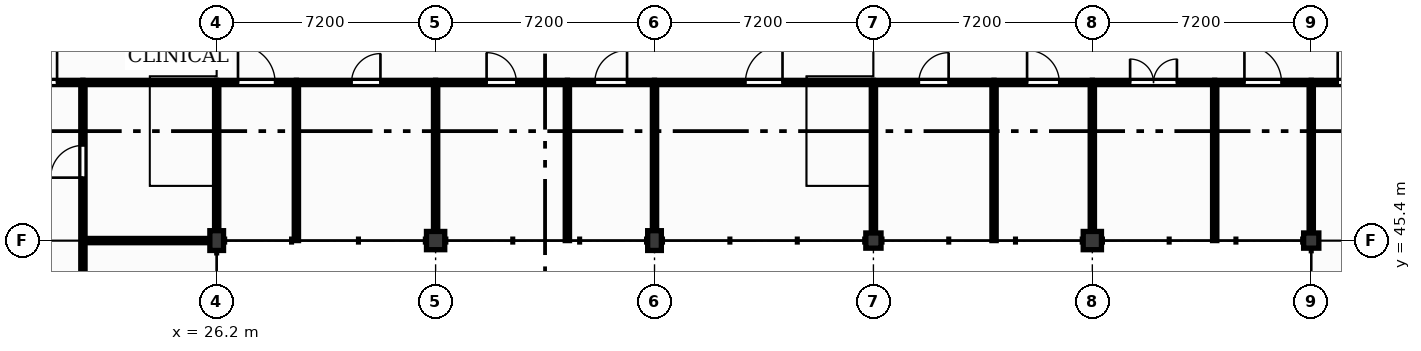
"""IFC4 building model, lengths in metres.
Left out: names, types, materials, properties, quantities, classifications, styles, units other than length and angle.
Written with IfcOpenShell. Run it as: python <this file> out.ifc"""

import sys

from ifc_helpers import new_model, si_unit, direction, frame, frame_2d, origin, origin_2d, place, context, subcontext, project, spatial, rectangle, extrude, element, fill, save


model = new_model("IFC4")
c1 = context("Model", 3, precision=1e-05, world=origin(), true_north=direction((0.0, 1.0)))
c2 = subcontext(c1, "Body", "Model", "MODEL_VIEW")
j1 = project(units=[si_unit("LENGTHUNIT", "METRE"), si_unit("PLANEANGLEUNIT", "RADIAN")], contexts=[c1])
p1 = place(None, origin())
s1 = spatial("IfcSite", under=j1, at=p1, CompositionType="ELEMENT")
p2 = place(p1, origin())
s2 = spatial("IfcBuilding", under=s1, at=p2, CompositionType="ELEMENT")
p3 = place(p2, origin())
s3 = spatial("IfcBuildingStorey", under=s2, at=p3, CompositionType="ELEMENT", Elevation=0.0)
p4 = place(p3, frame((26.2, 45.4, 0.0), z_axis=(0.0, 0.0, 1.0), x_axis=(1.0, 0.0, 0.0)))
e1 = element("IfcColumn", 1, at=p4, inside=s3, PredefinedType="COLUMN", context=c2, shape_type="SweptSolid", body=[
    extrude(rectangle(XDim=0.45, YDim=0.65, at=origin_2d()), origin(), (0.0, 0.0, 1.0), 4.2),
])
p5 = place(p3, frame((33.4, 45.4, 0.0), z_axis=(0.0, 0.0, 1.0), x_axis=(1.0, 0.0, 0.0)))
e2 = element("IfcColumn", 2, at=p5, inside=s3, PredefinedType="COLUMN", context=c2, shape_type="SweptSolid", body=[
    extrude(rectangle(XDim=0.6, YDim=0.6, at=origin_2d()), origin(), (0.0, 0.0, 1.0), 4.2),
])
p6 = place(p3, frame((40.6, 45.4, 0.0), z_axis=(0.0, 0.0, 1.0), x_axis=(1.0, 0.0, 0.0)))
e3 = element("IfcColumn", 3, at=p6, inside=s3, PredefinedType="COLUMN", context=c2, shape_type="SweptSolid", body=[
    extrude(rectangle(XDim=0.45, YDim=0.65, at=origin_2d()), origin(), (0.0, 0.0, 1.0), 4.2),
])
p7 = place(p3, frame((47.8, 45.4, 0.0), z_axis=(0.0, 0.0, 1.0), x_axis=(1.0, 0.0, 0.0)))
e4 = element("IfcColumn", 4, at=p7, inside=s3, PredefinedType="COLUMN", context=c2, shape_type="SweptSolid", body=[
    extrude(rectangle(XDim=0.5, YDim=0.5, at=origin_2d()), origin(), (0.0, 0.0, 1.0), 4.2),
])
p8 = place(p3, frame((55.0, 45.4, 0.0), z_axis=(0.0, 0.0, 1.0), x_axis=(1.0, 0.0, 0.0)))
e5 = element("IfcColumn", 5, at=p8, inside=s3, PredefinedType="COLUMN", context=c2, shape_type="SweptSolid", body=[
    extrude(rectangle(XDim=0.6, YDim=0.6, at=origin_2d()), origin(), (0.0, 0.0, 1.0), 4.2),
])
p9 = place(p3, frame((62.2, 45.4, 0.0), z_axis=(0.0, 0.0, 1.0), x_axis=(1.0, 0.0, 0.0)))
e6 = element("IfcColumn", 6, at=p9, inside=s3, PredefinedType="COLUMN", context=c2, shape_type="SweptSolid", body=[
    extrude(rectangle(XDim=0.5, YDim=0.5, at=origin_2d()), origin(), (0.0, 0.0, 1.0), 4.2),
])
p10 = place(p3, frame((19.0, 50.6, 0.0), z_axis=(0.0, 0.0, 1.0), x_axis=(1.0, 0.0, 0.0)))
e7 = element("IfcWall", 7, at=p10, inside=s3, PredefinedType="PARTITIONING", context=c2, shape_type="SweptSolid", body=[
    extrude(rectangle(XDim=2.8, YDim=0.14, at=frame_2d((1.4, 0.0))), origin(), (0.0, 0.0, 1.0), 4.18),
])
p11 = place(p10, frame((0.85, 0.0, 0.0)))
e8 = element("IfcOpeningElement", 8, at=p11, cuts=e7, PredefinedType="OPENING", context=c2, shape_type="SweptSolid", body=[
    extrude(rectangle(XDim=1.1, YDim=2.1, at=frame_2d((0.55, 1.05))), frame((0.0, 0.08, 0.0), z_axis=(0.0, -1.0, 0.0), x_axis=(1.0, 0.0, 0.0)), (0.0, 0.0, 1.0), 0.16),
])
p12 = place(p3, frame((21.8, 36.87, 0.0), z_axis=(0.0, 0.0, 1.0), x_axis=(0.0, 1.0, 0.0)))
e9 = element("IfcWall", 9, at=p12, inside=s3, PredefinedType="PARTITIONING", context=c2, shape_type="SweptSolid", body=[
    extrude(rectangle(XDim=8.46, YDim=0.14, at=frame_2d((4.23, 0.0))), origin(), (0.0, 0.0, 1.0), 4.18),
])
p13 = place(p12, frame((3.65, 0.0, 0.0)))
e10 = element("IfcOpeningElement", 10, at=p13, cuts=e9, PredefinedType="OPENING", context=c2, shape_type="SweptSolid", body=[
    extrude(rectangle(XDim=1.16, YDim=2.1, at=frame_2d((0.58, 1.05))), frame((0.0, 0.08, 0.0), z_axis=(0.0, -1.0, 0.0), x_axis=(1.0, 0.0, 0.0)), (0.0, 0.0, 1.0), 0.16),
])
p14 = place(p3, frame((21.8, 45.47, 0.0), z_axis=(0.0, 0.0, 1.0), x_axis=(0.0, 1.0, 0.0)))
e11 = element("IfcWall", 11, at=p14, inside=s3, PredefinedType="PARTITIONING", context=c2, shape_type="SweptSolid", body=[
    extrude(rectangle(XDim=5.06, YDim=0.14, at=frame_2d((2.53, 0.0))), origin(), (0.0, 0.0, 1.0), 4.18),
])
p15 = place(p14, frame((2.0, 0.0, 0.0)))
e12 = element("IfcOpeningElement", 12, at=p15, cuts=e11, PredefinedType="OPENING", context=c2, shape_type="SweptSolid", body=[
    extrude(rectangle(XDim=1.06, YDim=2.15, at=frame_2d((0.53, 1.075))), frame((0.0, 0.08, 0.0), z_axis=(0.0, -1.0, 0.0), x_axis=(1.0, 0.0, 0.0)), (0.0, 0.0, 1.0), 0.16),
])
p16 = place(p3, frame((21.8, 45.4, 0.0), z_axis=(0.0, 0.0, 1.0), x_axis=(1.0, 0.0, 0.0)))
e13 = element("IfcWall", 13, at=p16, inside=s3, PredefinedType="PARTITIONING", context=c2, shape_type="SweptSolid", body=[
    extrude(rectangle(XDim=4.175, YDim=0.14, at=frame_2d((2.087, 0.0))), origin(), (0.0, 0.0, 1.0), 3.25),
])
p17 = place(p3, frame((21.8, 50.6, 0.0), z_axis=(0.0, 0.0, 1.0), x_axis=(1.0, 0.0, 0.0)))
e14 = element("IfcWall", 14, at=p17, inside=s3, PredefinedType="PARTITIONING", context=c2, shape_type="SweptSolid", body=[
    extrude(rectangle(XDim=4.4, YDim=0.14, at=frame_2d((2.2, 0.0))), origin(), (0.0, 0.0, 1.0), 4.18),
])
p18 = place(p3, frame((26.2, 45.725, 0.0), z_axis=(0.0, 0.0, 1.0), x_axis=(0.0, 1.0, 0.0)))
e15 = element("IfcWall", 15, at=p18, inside=s3, PredefinedType="PARTITIONING", context=c2, shape_type="SweptSolid", body=[
    extrude(rectangle(XDim=4.805, YDim=0.14, at=frame_2d((2.402, 0.0))), origin(), (0.0, 0.0, 1.0), 3.5),
])
p19 = place(p3, frame((26.2, 50.6, 0.0), z_axis=(0.0, 0.0, 1.0), x_axis=(1.0, 0.0, 0.0)))
e16 = element("IfcWall", 16, at=p19, inside=s3, PredefinedType="PARTITIONING", context=c2, shape_type="SweptSolid", body=[
    extrude(rectangle(XDim=2.621, YDim=0.14, at=frame_2d((1.311, 0.0))), origin(), (0.0, 0.0, 1.0), 4.18),
])
p20 = place(p19, frame((0.7, 0.0, 0.0)))
e17 = element("IfcOpeningElement", 17, at=p20, cuts=e16, PredefinedType="OPENING", context=c2, shape_type="SweptSolid", body=[
    extrude(rectangle(XDim=1.22, YDim=2.1, at=frame_2d((0.61, 1.05))), frame((0.0, 0.08, 0.0), z_axis=(0.0, -1.0, 0.0), x_axis=(1.0, 0.0, 0.0)), (0.0, 0.0, 1.0), 0.16),
])
p21 = place(p3, frame((28.821, 45.4, 0.0), z_axis=(0.0, 0.0, 1.0), x_axis=(0.0, 1.0, 0.0)))
e18 = element("IfcWall", 18, at=p21, inside=s3, PredefinedType="PARTITIONING", context=c2, shape_type="SweptSolid", body=[
    extrude(rectangle(XDim=5.13, YDim=0.14, at=frame_2d((2.565, 0.0))), origin(), (0.0, 0.0, 1.0), 4.18),
])
p22 = place(p3, frame((28.821, 50.6, 0.0), z_axis=(0.0, 0.0, 1.0), x_axis=(1.0, 0.0, 0.0)))
e19 = element("IfcWall", 19, at=p22, inside=s3, PredefinedType="PARTITIONING", context=c2, shape_type="SweptSolid", body=[
    extrude(rectangle(XDim=4.579, YDim=0.14, at=frame_2d((2.29, 0.0))), origin(), (0.0, 0.0, 1.0), 4.18),
])
p23 = place(p22, frame((1.814, 0.0, 0.0)))
e20 = element("IfcOpeningElement", 20, at=p23, cuts=e19, PredefinedType="OPENING", context=c2, shape_type="SweptSolid", body=[
    extrude(rectangle(XDim=0.95, YDim=2.1, at=frame_2d((0.475, 1.05))), frame((0.0, 0.08, 0.0), z_axis=(0.0, -1.0, 0.0), x_axis=(1.0, 0.0, 0.0)), (0.0, 0.0, 1.0), 0.16),
])
p24 = place(p3, frame((33.4, 45.7, 0.0), z_axis=(0.0, 0.0, 1.0), x_axis=(0.0, 1.0, 0.0)))
e21 = element("IfcWall", 21, at=p24, inside=s3, PredefinedType="PARTITIONING", context=c2, shape_type="SweptSolid", body=[
    extrude(rectangle(XDim=4.83, YDim=0.14, at=frame_2d((2.415, 0.0))), origin(), (0.0, 0.0, 1.0), 3.5),
])
p25 = place(p3, frame((33.4, 50.6, 0.0), z_axis=(0.0, 0.0, 1.0), x_axis=(1.0, 0.0, 0.0)))
e22 = element("IfcWall", 22, at=p25, inside=s3, PredefinedType="PARTITIONING", context=c2, shape_type="SweptSolid", body=[
    extrude(rectangle(XDim=4.334, YDim=0.14, at=frame_2d((2.167, 0.0))), origin(), (0.0, 0.0, 1.0), 4.18),
])
p26 = place(p25, frame((1.677, 0.0, 0.0)))
e23 = element("IfcOpeningElement", 23, at=p26, cuts=e22, PredefinedType="OPENING", context=c2, shape_type="SweptSolid", body=[
    extrude(rectangle(XDim=0.98, YDim=2.15, at=frame_2d((0.49, 1.075))), frame((0.0, 0.08, 0.0), z_axis=(0.0, -1.0, 0.0), x_axis=(1.0, 0.0, 0.0)), (0.0, 0.0, 1.0), 0.16),
])
p27 = place(p3, frame((37.734, 45.4, 0.0), z_axis=(0.0, 0.0, 1.0), x_axis=(0.0, 1.0, 0.0)))
e24 = element("IfcWall", 24, at=p27, inside=s3, PredefinedType="PARTITIONING", context=c2, shape_type="SweptSolid", body=[
    extrude(rectangle(XDim=5.13, YDim=0.14, at=frame_2d((2.565, 0.0))), origin(), (0.0, 0.0, 1.0), 4.18),
])
p28 = place(p3, frame((37.734, 50.6, 0.0), z_axis=(0.0, 0.0, 1.0), x_axis=(1.0, 0.0, 0.0)))
e25 = element("IfcWall", 25, at=p28, inside=s3, PredefinedType="PARTITIONING", context=c2, shape_type="SweptSolid", body=[
    extrude(rectangle(XDim=2.866, YDim=0.14, at=frame_2d((1.433, 0.0))), origin(), (0.0, 0.0, 1.0), 4.18),
])
p29 = place(p28, frame((0.903, 0.0, 0.0)))
e26 = element("IfcOpeningElement", 26, at=p29, cuts=e25, PredefinedType="OPENING", context=c2, shape_type="SweptSolid", body=[
    extrude(rectangle(XDim=1.06, YDim=2.15, at=frame_2d((0.53, 1.075))), frame((0.0, 0.08, 0.0), z_axis=(0.0, -1.0, 0.0), x_axis=(1.0, 0.0, 0.0)), (0.0, 0.0, 1.0), 0.16),
])
p30 = place(p3, frame((40.6, 45.725, 0.0), z_axis=(0.0, 0.0, 1.0), x_axis=(0.0, 1.0, 0.0)))
e27 = element("IfcWall", 27, at=p30, inside=s3, PredefinedType="PARTITIONING", context=c2, shape_type="SweptSolid", body=[
    extrude(rectangle(XDim=4.805, YDim=0.14, at=frame_2d((2.402, 0.0))), origin(), (0.0, 0.0, 1.0), 3.5),
])
p31 = place(p3, frame((40.6, 50.6, 0.0), z_axis=(0.0, 0.0, 1.0), x_axis=(1.0, 0.0, 0.0)))
e28 = element("IfcWall", 28, at=p31, inside=s3, PredefinedType="PARTITIONING", context=c2, shape_type="SweptSolid", body=[
    extrude(rectangle(XDim=7.2, YDim=0.14, at=frame_2d((3.6, 0.0))), origin(), (0.0, 0.0, 1.0), 4.18),
])
p32 = place(p31, frame((2.99, 0.0, 0.0)))
e29 = element("IfcOpeningElement", 29, at=p32, cuts=e28, PredefinedType="OPENING", context=c2, shape_type="SweptSolid", body=[
    extrude(rectangle(XDim=1.22, YDim=2.1, at=frame_2d((0.61, 1.05))), frame((0.0, 0.08, 0.0), z_axis=(0.0, -1.0, 0.0), x_axis=(1.0, 0.0, 0.0)), (0.0, 0.0, 1.0), 0.16),
])
p33 = place(p3, frame((47.8, 45.65, 0.0), z_axis=(0.0, 0.0, 1.0), x_axis=(0.0, 1.0, 0.0)))
e30 = element("IfcWall", 30, at=p33, inside=s3, PredefinedType="PARTITIONING", context=c2, shape_type="SweptSolid", body=[
    extrude(rectangle(XDim=4.88, YDim=0.14, at=frame_2d((2.44, 0.0))), origin(), (0.0, 0.0, 1.0), 3.5),
])
p34 = place(p3, frame((47.8, 50.6, 0.0), z_axis=(0.0, 0.0, 1.0), x_axis=(1.0, 0.0, 0.0)))
e31 = element("IfcWall", 31, at=p34, inside=s3, PredefinedType="PARTITIONING", context=c2, shape_type="SweptSolid", body=[
    extrude(rectangle(XDim=3.967, YDim=0.14, at=frame_2d((1.983, 0.0))), origin(), (0.0, 0.0, 1.0), 4.18),
])
p35 = place(p34, frame((1.493, 0.0, 0.0)))
e32 = element("IfcOpeningElement", 32, at=p35, cuts=e31, PredefinedType="OPENING", context=c2, shape_type="SweptSolid", body=[
    extrude(rectangle(XDim=0.98, YDim=2.15, at=frame_2d((0.49, 1.075))), frame((0.0, 0.08, 0.0), z_axis=(0.0, -1.0, 0.0), x_axis=(1.0, 0.0, 0.0)), (0.0, 0.0, 1.0), 0.16),
])
p36 = place(p3, frame((51.767, 45.4, 0.0), z_axis=(0.0, 0.0, 1.0), x_axis=(0.0, 1.0, 0.0)))
e33 = element("IfcWall", 33, at=p36, inside=s3, PredefinedType="PARTITIONING", context=c2, shape_type="SweptSolid", body=[
    extrude(rectangle(XDim=5.13, YDim=0.14, at=frame_2d((2.565, 0.0))), origin(), (0.0, 0.0, 1.0), 4.18),
])
p37 = place(p3, frame((51.767, 50.6, 0.0), z_axis=(0.0, 0.0, 1.0), x_axis=(1.0, 0.0, 0.0)))
e34 = element("IfcWall", 34, at=p37, inside=s3, PredefinedType="PARTITIONING", context=c2, shape_type="SweptSolid", body=[
    extrude(rectangle(XDim=3.233, YDim=0.14, at=frame_2d((1.616, 0.0))), origin(), (0.0, 0.0, 1.0), 4.18),
])
p38 = place(p37, frame((1.086, 0.0, 0.0)))
e35 = element("IfcOpeningElement", 35, at=p38, cuts=e34, PredefinedType="OPENING", context=c2, shape_type="SweptSolid", body=[
    extrude(rectangle(XDim=1.06, YDim=2.15, at=frame_2d((0.53, 1.075))), frame((0.0, 0.08, 0.0), z_axis=(0.0, -1.0, 0.0), x_axis=(1.0, 0.0, 0.0)), (0.0, 0.0, 1.0), 0.16),
])
p39 = place(p3, frame((55.0, 45.7, 0.0), z_axis=(0.0, 0.0, 1.0), x_axis=(0.0, 1.0, 0.0)))
e36 = element("IfcWall", 36, at=p39, inside=s3, PredefinedType="PARTITIONING", context=c2, shape_type="SweptSolid", body=[
    extrude(rectangle(XDim=4.83, YDim=0.14, at=frame_2d((2.415, 0.0))), origin(), (0.0, 0.0, 1.0), 3.5),
])
p40 = place(p3, frame((55.0, 50.6, 0.0), z_axis=(0.0, 0.0, 1.0), x_axis=(1.0, 0.0, 0.0)))
e37 = element("IfcWall", 37, at=p40, inside=s3, PredefinedType="PARTITIONING", context=c2, shape_type="SweptSolid", body=[
    extrude(rectangle(XDim=4.025, YDim=0.14, at=frame_2d((2.012, 0.0))), origin(), (0.0, 0.0, 1.0), 4.18),
])
p41 = place(p40, frame((1.242, 0.0, 0.0)))
e38 = element("IfcOpeningElement", 38, at=p41, cuts=e37, PredefinedType="OPENING", context=c2, shape_type="SweptSolid", body=[
    extrude(rectangle(XDim=1.54, YDim=2.25, at=frame_2d((0.77, 1.125))), frame((0.0, 0.08, 0.0), z_axis=(0.0, -1.0, 0.0), x_axis=(1.0, 0.0, 0.0)), (0.0, 0.0, 1.0), 0.16),
])
p42 = place(p3, frame((59.025, 45.4, 0.0), z_axis=(0.0, 0.0, 1.0), x_axis=(0.0, 1.0, 0.0)))
e39 = element("IfcWall", 39, at=p42, inside=s3, PredefinedType="PARTITIONING", context=c2, shape_type="SweptSolid", body=[
    extrude(rectangle(XDim=5.13, YDim=0.14, at=frame_2d((2.565, 0.0))), origin(), (0.0, 0.0, 1.0), 4.18),
])
p43 = place(p3, frame((59.025, 50.6, 0.0), z_axis=(0.0, 0.0, 1.0), x_axis=(1.0, 0.0, 0.0)))
e40 = element("IfcWall", 40, at=p43, inside=s3, PredefinedType="PARTITIONING", context=c2, shape_type="SweptSolid", body=[
    extrude(rectangle(XDim=3.175, YDim=0.14, at=frame_2d((1.587, 0.0))), origin(), (0.0, 0.0, 1.0), 4.18),
])
p44 = place(p43, frame((0.978, 0.0, 0.0)))
e41 = element("IfcOpeningElement", 41, at=p44, cuts=e40, PredefinedType="OPENING", context=c2, shape_type="SweptSolid", body=[
    extrude(rectangle(XDim=1.22, YDim=2.1, at=frame_2d((0.61, 1.05))), frame((0.0, 0.08, 0.0), z_axis=(0.0, -1.0, 0.0), x_axis=(1.0, 0.0, 0.0)), (0.0, 0.0, 1.0), 0.16),
])
p45 = place(p3, frame((62.2, 45.65, 0.0), z_axis=(0.0, 0.0, 1.0), x_axis=(0.0, 1.0, 0.0)))
e42 = element("IfcWall", 42, at=p45, inside=s3, PredefinedType="PARTITIONING", context=c2, shape_type="SweptSolid", body=[
    extrude(rectangle(XDim=4.88, YDim=0.14, at=frame_2d((2.44, 0.0))), origin(), (0.0, 0.0, 1.0), 3.5),
])
p46 = place(p3, frame((62.2, 50.6, 0.0), z_axis=(0.0, 0.0, 1.0), x_axis=(1.0, 0.0, 0.0)))
e43 = element("IfcWall", 43, at=p46, inside=s3, PredefinedType="PARTITIONING", context=c2, shape_type="SweptSolid", body=[
    extrude(rectangle(XDim=2.8, YDim=0.14, at=frame_2d((1.4, 0.0))), origin(), (0.0, 0.0, 1.0), 4.18),
])
p47 = place(p46, frame((0.87, 0.0, 0.0)))
e44 = element("IfcOpeningElement", 44, at=p47, cuts=e43, PredefinedType="OPENING", context=c2, shape_type="SweptSolid", body=[
    extrude(rectangle(XDim=1.06, YDim=2.15, at=frame_2d((0.53, 1.075))), frame((0.0, 0.08, 0.0), z_axis=(0.0, -1.0, 0.0), x_axis=(1.0, 0.0, 0.0)), (0.0, 0.0, 1.0), 0.16),
])
p48 = place(p11, origin())
e45 = element("IfcDoor", 45, at=p48, inside=s3, OperationType="SINGLE_SWING_RIGHT", PredefinedType="DOOR", context=c2, shape_type="SweptSolid", body=[
    extrude(rectangle(XDim=1.1, YDim=2.1, at=frame_2d((0.55, 1.05))), frame((0.0, 0.025, 0.0), z_axis=(0.0, -1.0, 0.0), x_axis=(1.0, 0.0, 0.0)), (0.0, 0.0, 1.0), 0.05),
])
fill(e8, e45)
p49 = place(p47, origin())
e46 = element("IfcDoor", 46, at=p49, inside=s3, OperationType="SINGLE_SWING_LEFT", PredefinedType="DOOR", context=c2, shape_type="SweptSolid", body=[
    extrude(rectangle(XDim=1.06, YDim=2.15, at=frame_2d((0.53, 1.075))), frame((0.0, 0.025, 0.0), z_axis=(0.0, -1.0, 0.0), x_axis=(1.0, 0.0, 0.0)), (0.0, 0.0, 1.0), 0.05),
])
fill(e44, e46)
p50 = place(p15, origin())
e47 = element("IfcDoor", 47, at=p50, inside=s3, OperationType="SINGLE_SWING_LEFT", PredefinedType="DOOR", context=c2, shape_type="SweptSolid", body=[
    extrude(rectangle(XDim=1.06, YDim=2.15, at=frame_2d((0.53, 1.075))), frame((0.0, 0.025, 0.0), z_axis=(0.0, -1.0, 0.0), x_axis=(1.0, 0.0, 0.0)), (0.0, 0.0, 1.0), 0.05),
])
fill(e12, e47)
p51 = place(p20, origin())
e48 = element("IfcDoor", 48, at=p51, inside=s3, OperationType="SINGLE_SWING_LEFT", PredefinedType="DOOR", context=c2, shape_type="SweptSolid", body=[
    extrude(rectangle(XDim=1.22, YDim=2.1, at=frame_2d((0.61, 1.05))), frame((0.0, 0.025, 0.0), z_axis=(0.0, -1.0, 0.0), x_axis=(1.0, 0.0, 0.0)), (0.0, 0.0, 1.0), 0.05),
])
fill(e17, e48)
p52 = place(p23, origin())
e49 = element("IfcDoor", 49, at=p52, inside=s3, OperationType="SINGLE_SWING_RIGHT", PredefinedType="DOOR", context=c2, shape_type="SweptSolid", body=[
    extrude(rectangle(XDim=0.95, YDim=2.1, at=frame_2d((0.475, 1.05))), frame((0.0, 0.025, 0.0), z_axis=(0.0, -1.0, 0.0), x_axis=(1.0, 0.0, 0.0)), (0.0, 0.0, 1.0), 0.05),
])
fill(e20, e49)
p53 = place(p26, origin())
e50 = element("IfcDoor", 50, at=p53, inside=s3, OperationType="SINGLE_SWING_LEFT", PredefinedType="DOOR", context=c2, shape_type="SweptSolid", body=[
    extrude(rectangle(XDim=0.98, YDim=2.15, at=frame_2d((0.49, 1.075))), frame((0.0, 0.025, 0.0), z_axis=(0.0, -1.0, 0.0), x_axis=(1.0, 0.0, 0.0)), (0.0, 0.0, 1.0), 0.05),
])
fill(e23, e50)
p54 = place(p29, origin())
e51 = element("IfcDoor", 51, at=p54, inside=s3, OperationType="SINGLE_SWING_RIGHT", PredefinedType="DOOR", context=c2, shape_type="SweptSolid", body=[
    extrude(rectangle(XDim=1.06, YDim=2.15, at=frame_2d((0.53, 1.075))), frame((0.0, 0.025, 0.0), z_axis=(0.0, -1.0, 0.0), x_axis=(1.0, 0.0, 0.0)), (0.0, 0.0, 1.0), 0.05),
])
fill(e26, e51)
p55 = place(p32, origin())
e52 = element("IfcDoor", 52, at=p55, inside=s3, OperationType="SINGLE_SWING_RIGHT", PredefinedType="DOOR", context=c2, shape_type="SweptSolid", body=[
    extrude(rectangle(XDim=1.22, YDim=2.1, at=frame_2d((0.61, 1.05))), frame((0.0, 0.025, 0.0), z_axis=(0.0, -1.0, 0.0), x_axis=(1.0, 0.0, 0.0)), (0.0, 0.0, 1.0), 0.05),
])
fill(e29, e52)
p56 = place(p35, origin())
e53 = element("IfcDoor", 53, at=p56, inside=s3, OperationType="SINGLE_SWING_RIGHT", PredefinedType="DOOR", context=c2, shape_type="SweptSolid", body=[
    extrude(rectangle(XDim=0.98, YDim=2.15, at=frame_2d((0.49, 1.075))), frame((0.0, 0.025, 0.0), z_axis=(0.0, -1.0, 0.0), x_axis=(1.0, 0.0, 0.0)), (0.0, 0.0, 1.0), 0.05),
])
fill(e32, e53)
p57 = place(p38, origin())
e54 = element("IfcDoor", 54, at=p57, inside=s3, OperationType="SINGLE_SWING_LEFT", PredefinedType="DOOR", context=c2, shape_type="SweptSolid", body=[
    extrude(rectangle(XDim=1.06, YDim=2.15, at=frame_2d((0.53, 1.075))), frame((0.0, 0.025, 0.0), z_axis=(0.0, -1.0, 0.0), x_axis=(1.0, 0.0, 0.0)), (0.0, 0.0, 1.0), 0.05),
])
fill(e35, e54)
p58 = place(p41, origin())
e55 = element("IfcDoor", 55, at=p58, inside=s3, OperationType="DOUBLE_DOOR_SINGLE_SWING", PredefinedType="DOOR", context=c2, shape_type="SweptSolid", body=[
    extrude(rectangle(XDim=1.54, YDim=2.25, at=frame_2d((0.77, 1.125))), frame((0.0, 0.025, 0.0), z_axis=(0.0, -1.0, 0.0), x_axis=(1.0, 0.0, 0.0)), (0.0, 0.0, 1.0), 0.05),
])
fill(e38, e55)
p59 = place(p44, origin())
e56 = element("IfcDoor", 56, at=p59, inside=s3, OperationType="SINGLE_SWING_LEFT", PredefinedType="DOOR", context=c2, shape_type="SweptSolid", body=[
    extrude(rectangle(XDim=1.22, YDim=2.1, at=frame_2d((0.61, 1.05))), frame((0.0, 0.025, 0.0), z_axis=(0.0, -1.0, 0.0), x_axis=(1.0, 0.0, 0.0)), (0.0, 0.0, 1.0), 0.05),
])
fill(e41, e56)
save(model, sys.argv[1])
